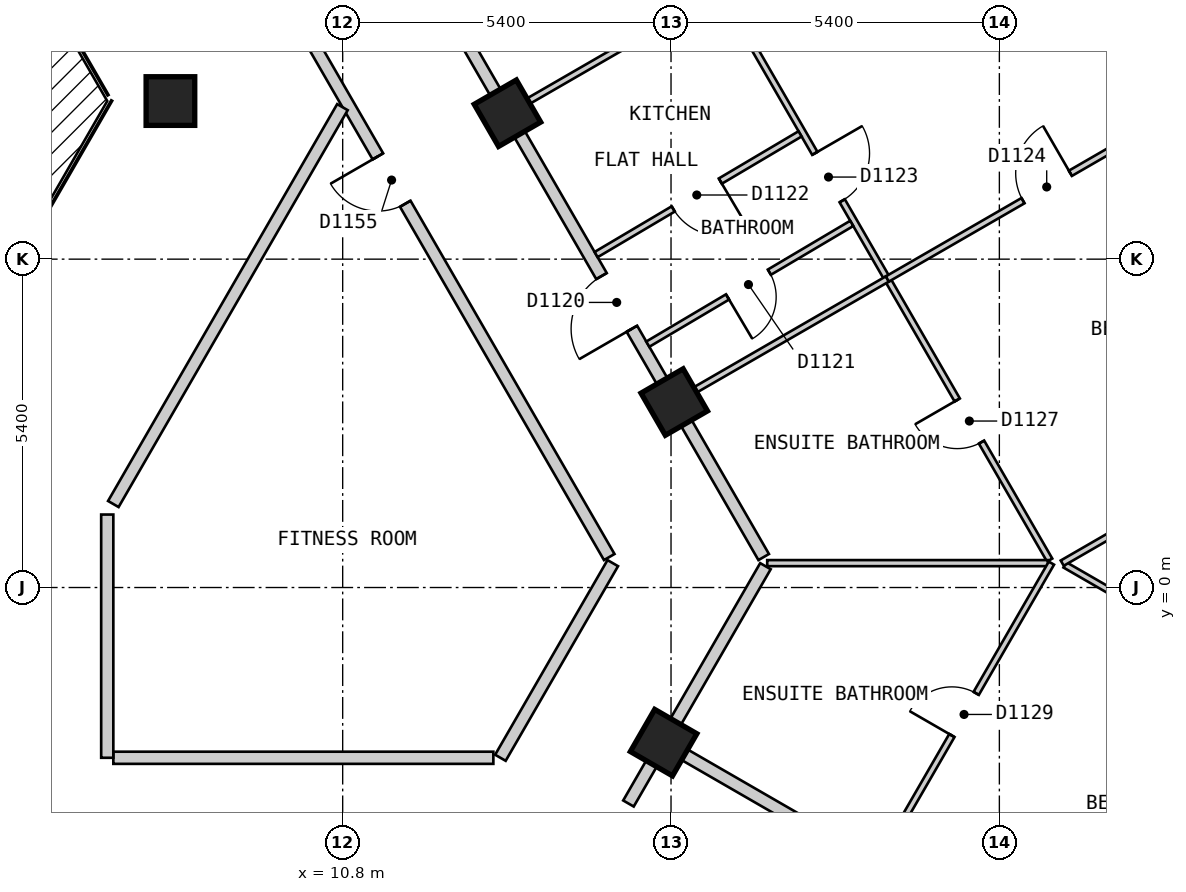
"""IFC4 building model, lengths in metres.
Left out: names, types, materials, properties, quantities, classifications, styles, units other than length and angle.
Written with IfcOpenShell. Run it as: python <this file> out.ifc"""

import sys

from ifc_helpers import new_model, si_unit, direction, frame, frame_2d, origin, origin_2d, place, context, subcontext, project, spatial, polyline, rectangle, outline, extrude, element, fill, save


model = new_model("IFC4")
c1 = context("Model", 3, precision=1e-05, world=origin(), true_north=direction((0.0, 1.0)))
c2 = subcontext(c1, "Body", "Model", "MODEL_VIEW")
j1 = project(units=[si_unit("LENGTHUNIT", "METRE"), si_unit("PLANEANGLEUNIT", "RADIAN")], contexts=[c1])
p1 = place(None, origin())
s1 = spatial("IfcSite", under=j1, at=p1, CompositionType="ELEMENT")
p2 = place(p1, origin())
s2 = spatial("IfcBuilding", under=s1, at=p2, CompositionType="ELEMENT")
p3 = place(p2, frame((0.0, 0.0, 138.6)))
s3 = spatial("IfcBuildingStorey", under=s2, at=p3, CompositionType="ELEMENT", Elevation=138.6)
for number, where, z_axis, x_axis in (
    (1, (16.078, -2.551, 0.0), (0.0, 0.0, 1.0), (0.5, 0.866, 0.0)),
    (2, (16.253, 3.05, 0.0), (0.0, 0.0, 1.0), (-0.5, 0.866, 0.0)),
    (3, (13.51, 7.8, 0.0), (0.0, 0.0, 1.0), (-0.5, 0.866, 0.0)),
    (4, (7.967, 8.0, 0.0), (0.0, 0.0, 1.0), (1.0, 0.0, 0.0)),
):
    element("IfcColumn", number, at=place(p3, frame(where, z_axis=z_axis, x_axis=x_axis)), inside=s3, PredefinedType="COLUMN", context=c2, shape_type="SweptSolid", body=[
        extrude(rectangle(XDim=0.8, YDim=0.8, at=origin_2d()), origin(), (0.0, 0.0, 1.0), 3.0),
    ])
p4 = place(p3, frame((15.862, -23.425, 0.0), z_axis=(0.0, 0.0, 1.0), x_axis=(0.500017503135, 0.866015298109, 0.0)))
e5 = element("IfcWall", 5, at=p4, inside=s3, PredefinedType="SOLIDWALL", context=c2, shape_type="SweptSolid", body=[
    extrude(outline(polyline([(0.0, -0.15), (24.711, -0.15), (24.631, 0.15), (0.08, 0.15), (0.0, -0.15)])), origin(), (0.0, 0.0, 1.0), 2.7),
])
p5 = place(p4, frame((1.4, 0.0, 0.15)))
e6 = element("IfcOpeningElement", 6, at=p5, cuts=e5, PredefinedType="OPENING", context=c2, shape_type="SweptSolid", body=[
    extrude(rectangle(XDim=1.5, YDim=2.1, at=frame_2d((0.75, 1.05))), frame((0.0, 0.16, 0.0), z_axis=(0.0, -1.0, 0.0), x_axis=(1.0, 0.0, 0.0)), (0.0, 0.0, 1.0), 0.32),
])
p6 = place(p4, frame((4.316, 0.0, 0.15)))
e7 = element("IfcOpeningElement", 7, at=p6, cuts=e5, PredefinedType="OPENING", context=c2, shape_type="SweptSolid", body=[
    extrude(rectangle(XDim=1.5, YDim=2.1, at=frame_2d((0.75, 1.05))), frame((0.0, 0.16, 0.0), z_axis=(0.0, -1.0, 0.0), x_axis=(1.0, 0.0, 0.0)), (0.0, 0.0, 1.0), 0.32),
])
p7 = place(p4, frame((7.231, 0.0, 0.15)))
e8 = element("IfcOpeningElement", 8, at=p7, cuts=e5, PredefinedType="OPENING", context=c2, shape_type="SweptSolid", body=[
    extrude(rectangle(XDim=1.5, YDim=2.1, at=frame_2d((0.75, 1.05))), frame((0.0, 0.16, 0.0), z_axis=(0.0, -1.0, 0.0), x_axis=(1.0, 0.0, 0.0)), (0.0, 0.0, 1.0), 0.32),
])
p8 = place(p4, frame((10.147, 0.0, 0.15)))
e9 = element("IfcOpeningElement", 9, at=p8, cuts=e5, PredefinedType="OPENING", context=c2, shape_type="SweptSolid", body=[
    extrude(rectangle(XDim=1.5, YDim=2.1, at=frame_2d((0.75, 1.05))), frame((0.0, 0.16, 0.0), z_axis=(0.0, -1.0, 0.0), x_axis=(1.0, 0.0, 0.0)), (0.0, 0.0, 1.0), 0.32),
])
p9 = place(p4, frame((13.062, 0.0, 0.15)))
e10 = element("IfcOpeningElement", 10, at=p9, cuts=e5, PredefinedType="OPENING", context=c2, shape_type="SweptSolid", body=[
    extrude(rectangle(XDim=1.5, YDim=2.1, at=frame_2d((0.75, 1.05))), frame((0.0, 0.16, 0.0), z_axis=(0.0, -1.0, 0.0), x_axis=(1.0, 0.0, 0.0)), (0.0, 0.0, 1.0), 0.32),
])
p10 = place(p4, frame((15.977, 0.0, 0.15)))
e11 = element("IfcOpeningElement", 11, at=p10, cuts=e5, PredefinedType="OPENING", context=c2, shape_type="SweptSolid", body=[
    extrude(rectangle(XDim=1.5, YDim=2.1, at=frame_2d((0.75, 1.05))), frame((0.0, 0.16, 0.0), z_axis=(0.0, -1.0, 0.0), x_axis=(1.0, 0.0, 0.0)), (0.0, 0.0, 1.0), 0.32),
])
p11 = place(p4, frame((18.893, 0.0, 0.15)))
e12 = element("IfcOpeningElement", 12, at=p11, cuts=e5, PredefinedType="OPENING", context=c2, shape_type="SweptSolid", body=[
    extrude(rectangle(XDim=1.5, YDim=2.1, at=frame_2d((0.75, 1.05))), frame((0.0, 0.16, 0.0), z_axis=(0.0, -1.0, 0.0), x_axis=(1.0, 0.0, 0.0)), (0.0, 0.0, 1.0), 0.32),
])
p12 = place(p4, frame((21.809, 0.0, 0.15)))
e13 = element("IfcOpeningElement", 13, at=p12, cuts=e5, PredefinedType="OPENING", context=c2, shape_type="SweptSolid", body=[
    extrude(rectangle(XDim=1.5, YDim=2.1, at=frame_2d((0.75, 1.05))), frame((0.0, 0.16, 0.0), z_axis=(0.0, -1.0, 0.0), x_axis=(1.0, 0.0, 0.0)), (0.0, 0.0, 1.0), 0.32),
])
p13 = place(p3, frame((28.218, 2.825, 0.0), z_axis=(0.0, 0.0, 1.0), x_axis=(-0.500020536353, 0.866013546791, 0.0)))
e14 = element("IfcWall", 14, at=p13, inside=s3, PredefinedType="SOLIDWALL", context=c2, shape_type="SweptSolid", body=[
    extrude(outline(polyline([(0.0, -0.15), (23.325, -0.15), (23.245, 0.15), (0.08, 0.15), (0.0, -0.15)])), origin(), (0.0, 0.0, 1.0), 2.7),
])
p14 = place(p13, frame((1.314, 0.0, 0.15)))
e15 = element("IfcOpeningElement", 15, at=p14, cuts=e14, PredefinedType="OPENING", context=c2, shape_type="SweptSolid", body=[
    extrude(rectangle(XDim=1.5, YDim=2.1, at=frame_2d((0.75, 1.05))), frame((0.0, 0.16, 0.0), z_axis=(0.0, -1.0, 0.0), x_axis=(1.0, 0.0, 0.0)), (0.0, 0.0, 1.0), 0.32),
])
p15 = place(p13, frame((4.056, 0.0, 0.15)))
e16 = element("IfcOpeningElement", 16, at=p15, cuts=e14, PredefinedType="OPENING", context=c2, shape_type="SweptSolid", body=[
    extrude(rectangle(XDim=1.5, YDim=2.1, at=frame_2d((0.75, 1.05))), frame((0.0, 0.16, 0.0), z_axis=(0.0, -1.0, 0.0), x_axis=(1.0, 0.0, 0.0)), (0.0, 0.0, 1.0), 0.32),
])
p16 = place(p13, frame((6.798, 0.0, 0.15)))
e17 = element("IfcOpeningElement", 17, at=p16, cuts=e14, PredefinedType="OPENING", context=c2, shape_type="SweptSolid", body=[
    extrude(rectangle(XDim=1.5, YDim=2.1, at=frame_2d((0.75, 1.05))), frame((0.0, 0.16, 0.0), z_axis=(0.0, -1.0, 0.0), x_axis=(1.0, 0.0, 0.0)), (0.0, 0.0, 1.0), 0.32),
])
p17 = place(p13, frame((9.541, 0.0, 0.15)))
e18 = element("IfcOpeningElement", 18, at=p17, cuts=e14, PredefinedType="OPENING", context=c2, shape_type="SweptSolid", body=[
    extrude(rectangle(XDim=1.5, YDim=2.1, at=frame_2d((0.75, 1.05))), frame((0.0, 0.16, 0.0), z_axis=(0.0, -1.0, 0.0), x_axis=(1.0, 0.0, 0.0)), (0.0, 0.0, 1.0), 0.32),
])
p18 = place(p13, frame((12.284, 0.0, 0.15)))
e19 = element("IfcOpeningElement", 19, at=p18, cuts=e14, PredefinedType="OPENING", context=c2, shape_type="SweptSolid", body=[
    extrude(rectangle(XDim=1.5, YDim=2.1, at=frame_2d((0.75, 1.05))), frame((0.0, 0.16, 0.0), z_axis=(0.0, -1.0, 0.0), x_axis=(1.0, 0.0, 0.0)), (0.0, 0.0, 1.0), 0.32),
])
p19 = place(p13, frame((15.027, 0.0, 0.15)))
e20 = element("IfcOpeningElement", 20, at=p19, cuts=e14, PredefinedType="OPENING", context=c2, shape_type="SweptSolid", body=[
    extrude(rectangle(XDim=1.5, YDim=2.1, at=frame_2d((0.75, 1.05))), frame((0.0, 0.16, 0.0), z_axis=(0.0, -1.0, 0.0), x_axis=(1.0, 0.0, 0.0)), (0.0, 0.0, 1.0), 0.32),
])
p20 = place(p13, frame((17.769, 0.0, 0.15)))
e21 = element("IfcOpeningElement", 21, at=p20, cuts=e14, PredefinedType="OPENING", context=c2, shape_type="SweptSolid", body=[
    extrude(rectangle(XDim=1.5, YDim=2.1, at=frame_2d((0.75, 1.05))), frame((0.0, 0.16, 0.0), z_axis=(0.0, -1.0, 0.0), x_axis=(1.0, 0.0, 0.0)), (0.0, 0.0, 1.0), 0.32),
])
p21 = place(p13, frame((20.511, 0.0, 0.15)))
e22 = element("IfcOpeningElement", 22, at=p21, cuts=e14, PredefinedType="OPENING", context=c2, shape_type="SweptSolid", body=[
    extrude(rectangle(XDim=1.5, YDim=2.1, at=frame_2d((0.75, 1.05))), frame((0.0, 0.16, 0.0), z_axis=(0.0, -1.0, 0.0), x_axis=(1.0, 0.0, 0.0)), (0.0, 0.0, 1.0), 0.32),
])
p22 = place(p3, frame((7.967, 13.0, 0.0), z_axis=(0.0, 0.0, 1.0), x_axis=(0.50003774998, -0.866003607726, 0.0)))
e23 = element("IfcWall", 23, at=p22, inside=s3, PredefinedType="PARTITIONING", context=c2, shape_type="SweptSolid", body=[
    extrude(rectangle(XDim=14.433, YDim=0.2, at=frame_2d((7.217, 0.0))), origin(), (0.0, 0.0, 1.0), 2.7),
])
p23 = place(p22, frame((6.824, 0.0, 0.0)))
e24 = element("IfcOpeningElement", 24, at=p23, cuts=e23, PredefinedType="OPENING", context=c2, shape_type="SweptSolid", body=[
    extrude(rectangle(XDim=0.9, YDim=2.1, at=frame_2d((0.45, 1.05))), frame((0.0, 0.11, 0.0), z_axis=(0.0, -1.0, 0.0), x_axis=(1.0, 0.0, 0.0)), (0.0, 0.0, 1.0), 0.22),
])
p24 = place(p3, frame((9.296, 15.1, 0.0), z_axis=(0.0, 0.0, 1.0), x_axis=(0.499974024244, -0.866040400375, 0.0)))
e25 = element("IfcWall", 25, at=p24, inside=s3, PredefinedType="PARTITIONING", context=c2, shape_type="SweptSolid", body=[
    extrude(rectangle(XDim=16.857, YDim=0.2, at=frame_2d((8.429, 0.0))), origin(), (0.0, 0.0, 1.0), 2.7),
])
p25 = place(p24, frame((11.522, 0.0, 0.0)))
e26 = element("IfcOpeningElement", 26, at=p25, cuts=e25, PredefinedType="OPENING", context=c2, shape_type="SweptSolid", body=[
    extrude(rectangle(XDim=1.0, YDim=2.1, at=frame_2d((0.5, 1.05))), frame((0.0, 0.11, 0.0), z_axis=(0.0, -1.0, 0.0), x_axis=(1.0, 0.0, 0.0)), (0.0, 0.0, 1.0), 0.22),
])
p26 = place(p3, frame((7.028, -2.8, 0.0), z_axis=(0.0, 0.0, 1.0), x_axis=(1.0, 0.0, 0.0)))
e27 = element("IfcWall", 27, at=p26, inside=s3, PredefinedType="PARTITIONING", context=c2, shape_type="SweptSolid", body=[
    extrude(rectangle(XDim=6.25, YDim=0.2, at=frame_2d((3.125, 0.0))), origin(), (0.0, 0.0, 1.0), 2.7),
])
p27 = place(p3, frame((7.028, 1.373, 0.0), z_axis=(0.0, 0.0, 1.0), x_axis=(0.499954271211, 0.866051803703, 0.0)))
e28 = element("IfcWall", 28, at=p27, inside=s3, PredefinedType="PARTITIONING", context=c2, shape_type="SweptSolid", body=[
    extrude(rectangle(XDim=7.536, YDim=0.2, at=frame_2d((3.768, 0.0))), origin(), (0.0, 0.0, 1.0), 2.7),
])
p28 = place(p3, frame((13.394, -2.8, 0.0), z_axis=(0.0, 0.0, 1.0), x_axis=(0.499968324138, 0.866043691079, 0.0)))
e29 = element("IfcWall", 29, at=p28, inside=s3, PredefinedType="PARTITIONING", context=c2, shape_type="SweptSolid", body=[
    extrude(rectangle(XDim=3.696, YDim=0.2, at=frame_2d((1.848, 0.0))), origin(), (0.0, 0.0, 1.0), 2.7),
])
p29 = place(p3, frame((15.5, -3.552, 0.0), z_axis=(0.0, 0.0, 1.0), x_axis=(0.499914724673, 0.86607463192, 0.0)))
e30 = element("IfcWall", 30, at=p29, inside=s3, PredefinedType="PARTITIONING", context=c2, shape_type="SweptSolid", body=[
    extrude(rectangle(XDim=4.507, YDim=0.2, at=frame_2d((2.253, 0.0))), origin(), (0.0, 0.0, 1.0), 2.7),
])
p30 = place(p3, frame((6.928, -2.8, 0.0), z_axis=(0.0, 0.0, 1.0), x_axis=(0.0, 1.0, 0.0)))
e31 = element("IfcWall", 31, at=p30, inside=s3, PredefinedType="PARTITIONING", context=c2, shape_type="SweptSolid", body=[
    extrude(rectangle(XDim=4.0, YDim=0.2, at=frame_2d((2.0, 0.0))), origin(), (0.0, 0.0, 1.0), 2.7),
])
p31 = place(p3, frame((14.323, 14.487, 0.0), z_axis=(0.0, 0.0, 1.0), x_axis=(0.500011052545, -0.866019022501, 0.0)))
e32 = element("IfcWall", 32, at=p31, inside=s3, PredefinedType="PARTITIONING", context=c2, shape_type="SweptSolid", body=[
    extrude(rectangle(XDim=16.208, YDim=0.1, at=frame_2d((8.104, 0.0))), origin(), (0.0, 0.0, 1.0), 2.7),
])
p32 = place(p31, frame((8.484, 0.0, 0.0)))
e33 = element("IfcOpeningElement", 33, at=p32, cuts=e32, PredefinedType="OPENING", context=c2, shape_type="SweptSolid", body=[
    extrude(rectangle(XDim=0.9, YDim=2.1, at=frame_2d((0.45, 1.05))), frame((0.0, 0.06, 0.0), z_axis=(0.0, -1.0, 0.0), x_axis=(1.0, 0.0, 0.0)), (0.0, 0.0, 1.0), 0.12),
])
p33 = place(p31, frame((2.252, 0.0, 0.0)))
e34 = element("IfcOpeningElement", 34, at=p33, cuts=e32, PredefinedType="OPENING", context=c2, shape_type="SweptSolid", body=[
    extrude(rectangle(XDim=0.8, YDim=2.1, at=frame_2d((0.4, 1.05))), frame((0.0, 0.06, 0.0), z_axis=(0.0, -1.0, 0.0), x_axis=(1.0, 0.0, 0.0)), (0.0, 0.0, 1.0), 0.12),
])
p34 = place(p31, frame((13.167, 0.0, 0.0)))
e35 = element("IfcOpeningElement", 35, at=p34, cuts=e32, PredefinedType="OPENING", context=c2, shape_type="SweptSolid", body=[
    extrude(rectangle(XDim=0.8, YDim=2.1, at=frame_2d((0.4, 1.05))), frame((0.0, 0.06, 0.0), z_axis=(0.0, -1.0, 0.0), x_axis=(1.0, 0.0, 0.0)), (0.0, 0.0, 1.0), 0.12),
])
p35 = place(p3, frame((22.679, 0.372, 0.0), z_axis=(0.0, 0.0, 1.0), x_axis=(0.865985260119, -0.500069524424, 0.0)))
e36 = element("IfcWall", 36, at=p35, inside=s3, PredefinedType="PARTITIONING", context=c2, shape_type="SweptSolid", body=[
    extrude(rectangle(XDim=5.845, YDim=0.1, at=frame_2d((2.923, 0.0))), origin(), (0.0, 0.0, 1.0), 2.7),
])
p36 = place(p35, frame((2.444, 0.0, 0.0)))
e37 = element("IfcOpeningElement", 37, at=p36, cuts=e36, PredefinedType="OPENING", context=c2, shape_type="SweptSolid", body=[
    extrude(rectangle(XDim=0.9, YDim=2.1, at=frame_2d((0.45, 1.05))), frame((0.0, 0.06, 0.0), z_axis=(0.0, -1.0, 0.0), x_axis=(1.0, 0.0, 0.0)), (0.0, 0.0, 1.0), 0.12),
])
p37 = place(p3, frame((17.782, 0.401, 0.0), z_axis=(0.0, 0.0, 1.0), x_axis=(1.0, 0.0, 0.0)))
e38 = element("IfcWall", 38, at=p37, inside=s3, PredefinedType="PARTITIONING", context=c2, shape_type="SweptSolid", body=[
    extrude(rectangle(XDim=4.616, YDim=0.1, at=frame_2d((2.308, 0.0))), origin(), (0.0, 0.0, 1.0), 2.7),
])
p38 = place(p3, frame((19.633, -4.488, 0.0), z_axis=(0.0, 0.0, 1.0), x_axis=(0.500050624552, 0.865996173713, 0.0)))
e39 = element("IfcWall", 39, at=p38, inside=s3, PredefinedType="PARTITIONING", context=c2, shape_type="SweptSolid", body=[
    extrude(rectangle(XDim=5.646, YDim=0.1, at=frame_2d((2.823, 0.0))), origin(), (0.0, 0.0, 1.0), 2.7),
])
p39 = place(p38, frame((2.372, 0.0, 0.0)))
e40 = element("IfcOpeningElement", 40, at=p39, cuts=e39, PredefinedType="OPENING", context=c2, shape_type="SweptSolid", body=[
    extrude(rectangle(XDim=0.8, YDim=2.1, at=frame_2d((0.4, 1.05))), frame((0.0, 0.06, 0.0), z_axis=(0.0, -1.0, 0.0), x_axis=(1.0, 0.0, 0.0)), (0.0, 0.0, 1.0), 0.12),
])
p40 = place(p3, frame((16.339, 3.1, 0.0), z_axis=(0.0, 0.0, 1.0), x_axis=(0.866031112038, 0.499990112884, 0.0)))
e41 = element("IfcWall", 41, at=p40, inside=s3, PredefinedType="PARTITIONING", context=c2, shape_type="SweptSolid", body=[
    extrude(rectangle(XDim=3.948, YDim=0.1, at=frame_2d((1.974, 0.0))), origin(), (0.0, 0.0, 1.0), 2.7),
])
p41 = place(p3, frame((22.634, 0.401, 0.0), z_axis=(0.0, 0.0, 1.0), x_axis=(0.86601325737, 0.500021037617, 0.0)))
e42 = element("IfcWall", 42, at=p41, inside=s3, PredefinedType="PARTITIONING", context=c2, shape_type="SweptSolid", body=[
    extrude(rectangle(XDim=5.898, YDim=0.1, at=frame_2d((2.949, 0.0))), origin(), (0.0, 0.0, 1.0), 2.7),
])
p42 = place(p41, frame((2.499, 0.0, 0.0)))
e43 = element("IfcOpeningElement", 43, at=p42, cuts=e42, PredefinedType="OPENING", context=c2, shape_type="SweptSolid", body=[
    extrude(rectangle(XDim=0.9, YDim=2.1, at=frame_2d((0.45, 1.05))), frame((0.0, 0.06, 0.0), z_axis=(0.0, -1.0, 0.0), x_axis=(1.0, 0.0, 0.0)), (0.0, 0.0, 1.0), 0.12),
])
p43 = place(p3, frame((13.597, 7.85, 0.0), z_axis=(0.0, 0.0, 1.0), x_axis=(0.865979019114, 0.500080332001, 0.0)))
e44 = element("IfcWall", 44, at=p43, inside=s3, PredefinedType="PARTITIONING", context=c2, shape_type="SweptSolid", body=[
    extrude(rectangle(XDim=3.897, YDim=0.1, at=frame_2d((1.949, 0.0))), origin(), (0.0, 0.0, 1.0), 2.7),
])
p44 = place(p3, frame((15.818, 4.002, 0.0), z_axis=(0.0, 0.0, 1.0), x_axis=(0.860457323494, 0.509522516132, 0.0)))
e45 = element("IfcWall", 45, at=p44, inside=s3, PredefinedType="PARTITIONING", context=c2, shape_type="SweptSolid", body=[
    extrude(rectangle(XDim=3.898, YDim=0.1, at=frame_2d((1.949, 0.0))), origin(), (0.0, 0.0, 1.0), 2.7),
])
p45 = place(p44, frame((1.524, 0.0, 0.0)))
e46 = element("IfcOpeningElement", 46, at=p45, cuts=e45, PredefinedType="OPENING", context=c2, shape_type="SweptSolid", body=[
    extrude(rectangle(XDim=0.8, YDim=2.1, at=frame_2d((0.4, 1.05))), frame((0.0, 0.06, 0.0), z_axis=(0.0, -1.0, 0.0), x_axis=(1.0, 0.0, 0.0)), (0.0, 0.0, 1.0), 0.12),
])
p46 = place(p3, frame((14.968, 5.475, 0.0), z_axis=(0.0, 0.0, 1.0), x_axis=(0.860594613521, 0.509290596005, 0.0)))
e47 = element("IfcWall", 47, at=p46, inside=s3, PredefinedType="PARTITIONING", context=c2, shape_type="SweptSolid", body=[
    extrude(rectangle(XDim=3.897, YDim=0.1, at=frame_2d((1.949, 0.0))), origin(), (0.0, 0.0, 1.0), 2.7),
])
p47 = place(p46, frame((1.474, 0.0, 0.0)))
e48 = element("IfcOpeningElement", 48, at=p47, cuts=e47, PredefinedType="OPENING", context=c2, shape_type="SweptSolid", body=[
    extrude(rectangle(XDim=0.9, YDim=2.1, at=frame_2d((0.45, 1.05))), frame((0.0, 0.06, 0.0), z_axis=(0.0, -1.0, 0.0), x_axis=(1.0, 0.0, 0.0)), (0.0, 0.0, 1.0), 0.12),
])
p48 = place(p3, frame((16.165, -2.601, 0.0), z_axis=(0.0, 0.0, 1.0), x_axis=(0.866016855193, -0.500014806302, 0.0)))
e49 = element("IfcWall", 49, at=p48, inside=s3, PredefinedType="PARTITIONING", context=c2, shape_type="SweptSolid", body=[
    extrude(rectangle(XDim=10.0, YDim=0.2, at=frame_2d((5.0, 0.0))), origin(), (0.0, 0.0, 1.0), 2.7),
])
p49 = place(p3, frame((19.758, 5.074, 0.0), z_axis=(0.0, 0.0, 1.0), x_axis=(0.866007554612, 0.500030914399, 0.0)))
e50 = element("IfcWall", 50, at=p49, inside=s3, PredefinedType="PARTITIONING", context=c2, shape_type="SweptSolid", body=[
    extrude(rectangle(XDim=6.052, YDim=0.1, at=frame_2d((3.026, 0.0))), origin(), (0.0, 0.0, 1.0), 2.7),
])
p50 = place(p49, frame((2.576, 0.0, 0.0)))
e51 = element("IfcOpeningElement", 51, at=p50, cuts=e50, PredefinedType="OPENING", context=c2, shape_type="SweptSolid", body=[
    extrude(rectangle(XDim=0.9, YDim=2.1, at=frame_2d((0.45, 1.05))), frame((0.0, 0.06, 0.0), z_axis=(0.0, -1.0, 0.0), x_axis=(1.0, 0.0, 0.0)), (0.0, 0.0, 1.0), 0.12),
])
p51 = place(p25, origin())
e52 = element("IfcDoor", 52, at=p51, inside=s3, OperationType="SINGLE_SWING_RIGHT", PredefinedType="DOOR", context=c2, shape_type="SweptSolid", body=[
    extrude(rectangle(XDim=1.0, YDim=2.1, at=frame_2d((0.5, 1.05))), frame((0.0, 0.025, 0.0), z_axis=(0.0, -1.0, 0.0), x_axis=(1.0, 0.0, 0.0)), (0.0, 0.0, 1.0), 0.05),
])
fill(e26, e52)
p52 = place(p45, origin())
e53 = element("IfcDoor", 53, at=p52, inside=s3, OperationType="SINGLE_SWING_LEFT", PredefinedType="DOOR", context=c2, shape_type="SweptSolid", body=[
    extrude(rectangle(XDim=0.8, YDim=2.1, at=frame_2d((0.4, 1.05))), frame((0.0, 0.025, 0.0), z_axis=(0.0, -1.0, 0.0), x_axis=(1.0, 0.0, 0.0)), (0.0, 0.0, 1.0), 0.05),
])
fill(e46, e53)
p53 = place(p47, origin())
e54 = element("IfcDoor", 54, at=p53, inside=s3, OperationType="SINGLE_SWING_RIGHT", PredefinedType="DOOR", context=c2, shape_type="SweptSolid", body=[
    extrude(rectangle(XDim=0.9, YDim=2.1, at=frame_2d((0.45, 1.05))), frame((0.0, 0.025, 0.0), z_axis=(0.0, -1.0, 0.0), x_axis=(1.0, 0.0, 0.0)), (0.0, 0.0, 1.0), 0.05),
])
fill(e48, e54)
p54 = place(p32, origin())
e55 = element("IfcDoor", 55, at=p54, inside=s3, OperationType="SINGLE_SWING_LEFT", PredefinedType="DOOR", context=c2, shape_type="SweptSolid", body=[
    extrude(rectangle(XDim=0.9, YDim=2.1, at=frame_2d((0.45, 1.05))), frame((0.0, 0.025, 0.0), z_axis=(0.0, -1.0, 0.0), x_axis=(1.0, 0.0, 0.0)), (0.0, 0.0, 1.0), 0.05),
])
fill(e33, e55)
p55 = place(p50, origin())
e56 = element("IfcDoor", 56, at=p55, inside=s3, OperationType="SINGLE_SWING_RIGHT", PredefinedType="DOOR", context=c2, shape_type="SweptSolid", body=[
    extrude(rectangle(XDim=0.9, YDim=2.1, at=frame_2d((0.45, 1.05))), frame((0.0, 0.025, 0.0), z_axis=(0.0, -1.0, 0.0), x_axis=(1.0, 0.0, 0.0)), (0.0, 0.0, 1.0), 0.05),
])
fill(e51, e56)
p56 = place(p34, origin())
e57 = element("IfcDoor", 57, at=p56, inside=s3, OperationType="SINGLE_SWING_LEFT", PredefinedType="DOOR", context=c2, shape_type="SweptSolid", body=[
    extrude(rectangle(XDim=0.8, YDim=2.1, at=frame_2d((0.4, 1.05))), frame((0.0, 0.025, 0.0), z_axis=(0.0, -1.0, 0.0), x_axis=(1.0, 0.0, 0.0)), (0.0, 0.0, 1.0), 0.05),
])
fill(e35, e57)
p57 = place(p39, origin())
e58 = element("IfcDoor", 58, at=p57, inside=s3, OperationType="SINGLE_SWING_LEFT", PredefinedType="DOOR", context=c2, shape_type="SweptSolid", body=[
    extrude(rectangle(XDim=0.8, YDim=2.1, at=frame_2d((0.4, 1.05))), frame((0.0, 0.025, 0.0), z_axis=(0.0, -1.0, 0.0), x_axis=(1.0, 0.0, 0.0)), (0.0, 0.0, 1.0), 0.05),
])
fill(e40, e58)
p58 = place(p23, origin())
e59 = element("IfcDoor", 59, at=p58, inside=s3, OperationType="SINGLE_SWING_LEFT", PredefinedType="DOOR", context=c2, shape_type="SweptSolid", body=[
    extrude(rectangle(XDim=0.9, YDim=2.1, at=frame_2d((0.45, 1.05))), frame((0.0, 0.025, 0.0), z_axis=(0.0, -1.0, 0.0), x_axis=(1.0, 0.0, 0.0)), (0.0, 0.0, 1.0), 0.05),
])
fill(e24, e59)
save(model, sys.argv[1])
